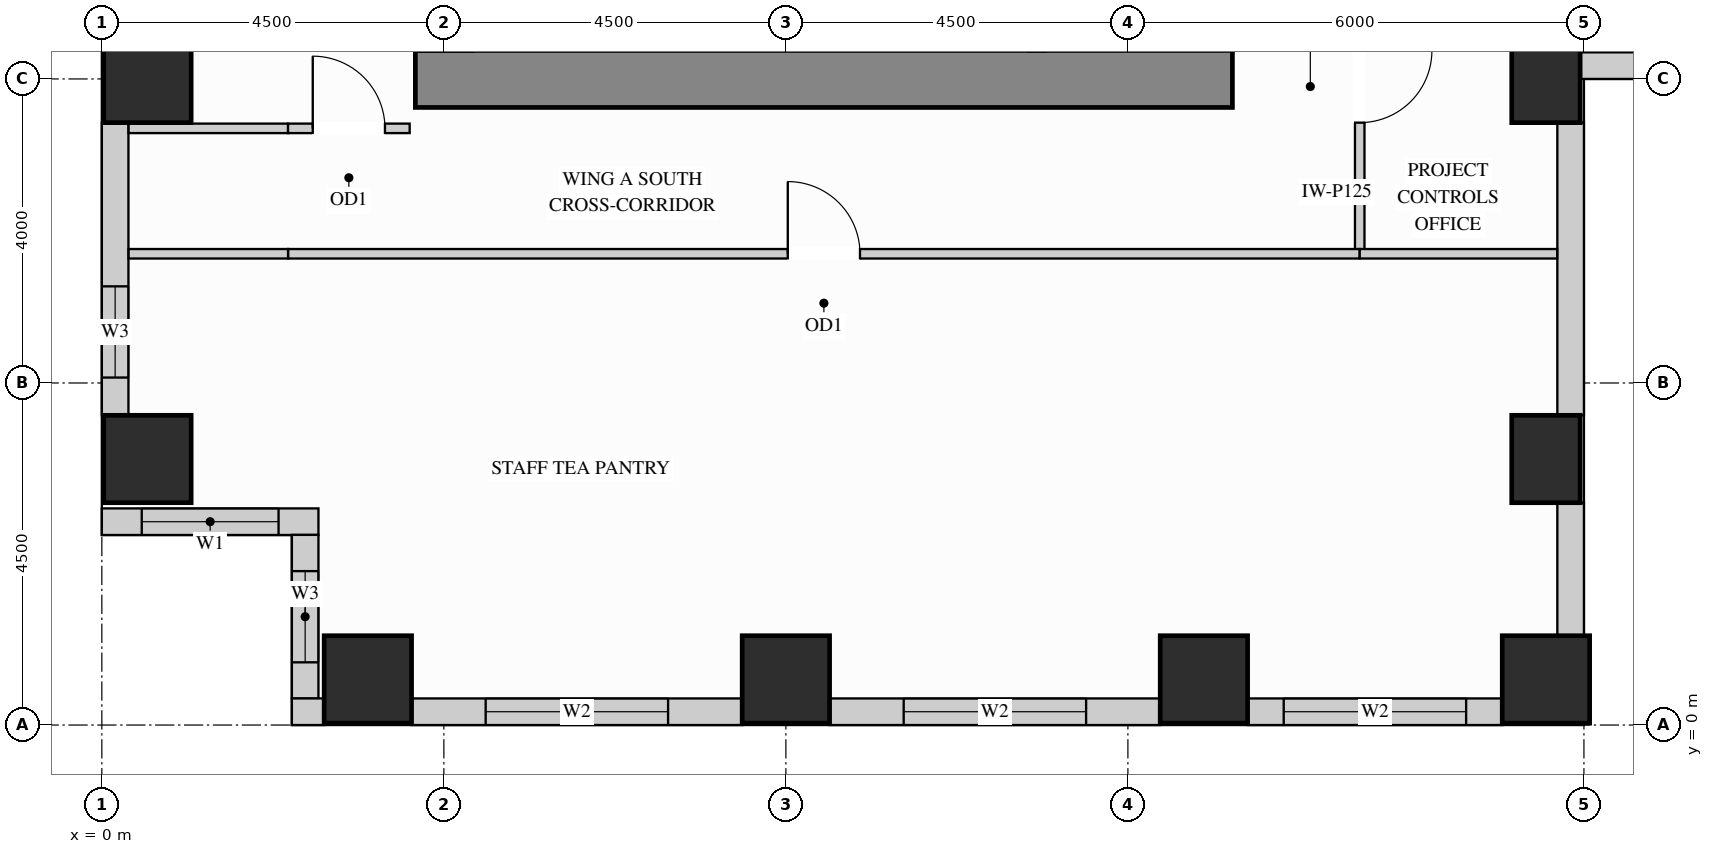
"""IFC4 building model, lengths in metres.
Left out: names, types, materials, properties, quantities, classifications, styles, units other than length and angle.
Written with IfcOpenShell. Run it as: python <this file> out.ifc"""

import sys

from ifc_helpers import new_model, si_unit, direction, frame, frame_2d, origin, origin_2d, place, context, subcontext, project, spatial, rectangle, extrude, source, transform, mapped, element, fill, save


model = new_model("IFC4")
c1 = context("Model", 3, precision=1e-05, world=origin(), true_north=direction((0.0, 1.0)))
c2 = subcontext(c1, "Body", "Model", "MODEL_VIEW")
j1 = project(units=[si_unit("LENGTHUNIT", "METRE"), si_unit("PLANEANGLEUNIT", "RADIAN")], contexts=[c1])
p1 = place(None, origin())
s1 = spatial("IfcSite", under=j1, at=p1, CompositionType="ELEMENT")
p2 = place(p1, origin())
s2 = spatial("IfcBuilding", under=s1, at=p2, CompositionType="ELEMENT")
p3 = place(p2, frame((0.0, 0.0, 135.0)))
s3 = spatial("IfcBuildingStorey", under=s2, at=p3, CompositionType="ELEMENT", Elevation=135.0)
m1 = source(origin(), c2, "Body", "SweptSolid", [
    extrude(rectangle(XDim=0.9, YDim=1.15, at=origin_2d()), origin(), (0.0, 0.0, 1.0), 3.32),
])
for number, where, z_axis, x_axis in (
    (1, (19.0, 3.5, 0.0), (0.0, 0.0, 1.0), (1.0, 0.0, 0.0)),
    (2, (19.0, 8.5, 0.0), (0.0, 0.0, 1.0), (1.0, 0.0, 0.0)),
):
    element("IfcColumn", number, at=place(p3, frame(where, z_axis=z_axis, x_axis=x_axis)), inside=s3, PredefinedType="COLUMN", context=c2, shape_type="MappedRepresentation", body=[
        mapped(m1, transform((0.0, 0.0, 0.0), x_axis=(1.0, 0.0, 0.0), y_axis=(0.0, 1.0, 0.0), z_axis=(0.0, 0.0, 1.0))),
    ])
m2 = source(origin(), c2, "Body", "SweptSolid", [
    extrude(rectangle(XDim=1.15, YDim=1.15, at=origin_2d()), origin(), (0.0, 0.0, 1.0), 3.32),
])
for number, where, z_axis, x_axis in (
    (3, (14.5, 0.6, 0.0), (0.0, 0.0, 1.0), (1.0, 0.0, 0.0)),
    (4, (19.0, 0.6, 0.0), (0.0, 0.0, 1.0), (1.0, 0.0, 0.0)),
    (5, (3.5, 0.6, 0.0), (0.0, 0.0, 1.0), (1.0, 0.0, 0.0)),
    (6, (9.0, 0.6, 0.0), (0.0, 0.0, 1.0), (1.0, 0.0, 0.0)),
    (7, (0.6, 3.5, 0.0), (0.0, 0.0, 1.0), (1.0, 0.0, 0.0)),
    (8, (0.6, 8.5, 0.0), (0.0, 0.0, 1.0), (1.0, 0.0, 0.0)),
):
    element("IfcColumn", number, at=place(p3, frame(where, z_axis=z_axis, x_axis=x_axis)), inside=s3, PredefinedType="COLUMN", context=c2, shape_type="MappedRepresentation", body=[
        mapped(m2, transform((0.0, 0.0, 0.0), x_axis=(1.0, 0.0, 0.0), y_axis=(0.0, 1.0, 0.0), z_axis=(0.0, 0.0, 1.0))),
    ])
m3 = source(origin(), c2, "Body", "SweptSolid", [
    extrude(rectangle(XDim=10.75, YDim=0.75, at=frame_2d((5.375, 0.0))), origin(), (0.0, 0.0, 1.0), 3.32),
])
p4 = place(p3, frame((4.125, 8.5, 0.0), z_axis=(0.0, 0.0, 1.0), x_axis=(1.0, 0.0, 0.0)))
e9 = element("IfcWall", 9, at=p4, inside=s3, PredefinedType="SHEAR", context=c2, shape_type="MappedRepresentation", body=[
    mapped(m3, transform((0.0, 0.0, 0.0), x_axis=(1.0, 0.0, 0.0), y_axis=(0.0, 1.0, 0.0), z_axis=(0.0, 0.0, 1.0))),
])
p5 = place(p3, frame((0.175, 7.927, 0.0), z_axis=(0.0, 0.0, 1.0), x_axis=(0.0, -1.0, 0.0)))
e10 = element("IfcWall", 10, at=p5, inside=s3, PredefinedType="SOLIDWALL", context=c2, shape_type="SweptSolid", body=[
    extrude(rectangle(XDim=3.854, YDim=0.35, at=frame_2d((1.927, 0.0))), origin(), (0.0, 0.0, 1.0), 3.305),
])
p6 = place(p5, frame((2.156, 0.0, 0.78)))
e11 = element("IfcOpeningElement", 11, at=p6, cuts=e10, PredefinedType="OPENING", context=c2, shape_type="SweptSolid", body=[
    extrude(rectangle(XDim=1.2, YDim=2.1, at=frame_2d((0.6, 1.05))), frame((0.0, 0.185, 0.0), z_axis=(0.0, -1.0, 0.0), x_axis=(1.0, 0.0, 0.0)), (0.0, 0.0, 1.0), 0.37),
])
p7 = place(p3, frame((0.0, 2.675, 0.0), z_axis=(0.0, 0.0, 1.0), x_axis=(1.0, 0.0, 0.0)))
e12 = element("IfcWall", 12, at=p7, inside=s3, PredefinedType="SOLIDWALL", context=c2, shape_type="SweptSolid", body=[
    extrude(rectangle(XDim=2.85, YDim=0.35, at=frame_2d((1.425, 0.0))), origin(), (0.0, 0.0, 1.0), 3.305),
])
p8 = place(p7, frame((0.525, 0.0, 0.78)))
e13 = element("IfcOpeningElement", 13, at=p8, cuts=e12, PredefinedType="OPENING", context=c2, shape_type="SweptSolid", body=[
    extrude(rectangle(XDim=1.8, YDim=2.1, at=frame_2d((0.9, 1.05))), frame((0.0, 0.185, 0.0), z_axis=(0.0, -1.0, 0.0), x_axis=(1.0, 0.0, 0.0)), (0.0, 0.0, 1.0), 0.37),
])
p9 = place(p3, frame((2.675, 2.502, 0.0), z_axis=(0.0, 0.0, 1.0), x_axis=(0.0, -1.0, 0.0)))
e14 = element("IfcWall", 14, at=p9, inside=s3, PredefinedType="SOLIDWALL", context=c2, shape_type="SweptSolid", body=[
    extrude(rectangle(XDim=2.154, YDim=0.35, at=frame_2d((1.077, 0.0))), origin(), (0.0, 0.0, 1.0), 3.305),
])
p10 = place(p9, frame((0.477, 0.0, 0.78)))
e15 = element("IfcOpeningElement", 15, at=p10, cuts=e14, PredefinedType="OPENING", context=c2, shape_type="SweptSolid", body=[
    extrude(rectangle(XDim=1.2, YDim=2.1, at=frame_2d((0.6, 1.05))), frame((0.0, 0.185, 0.0), z_axis=(0.0, -1.0, 0.0), x_axis=(1.0, 0.0, 0.0)), (0.0, 0.0, 1.0), 0.37),
])
m4 = source(origin(), c2, "Body", "SweptSolid", [
    extrude(rectangle(XDim=0.427, YDim=0.35, at=frame_2d((0.213, 0.0))), origin(), (0.0, 0.0, 1.0), 3.305),
])
p11 = place(p3, frame((2.5, 0.175, 0.0), z_axis=(0.0, 0.0, 1.0), x_axis=(1.0, 0.0, 0.0)))
e16 = element("IfcWall", 16, at=p11, inside=s3, PredefinedType="SOLIDWALL", context=c2, shape_type="MappedRepresentation", body=[
    mapped(m4, transform((0.0, 0.0, 0.0), x_axis=(1.0, 0.0, 0.0), y_axis=(0.0, 1.0, 0.0), z_axis=(0.0, 0.0, 1.0))),
])
p12 = place(p3, frame((4.073, 0.175, 0.0), z_axis=(0.0, 0.0, 1.0), x_axis=(1.0, 0.0, 0.0)))
e17 = element("IfcWall", 17, at=p12, inside=s3, PredefinedType="SOLIDWALL", context=c2, shape_type="SweptSolid", body=[
    extrude(rectangle(XDim=4.354, YDim=0.35, at=frame_2d((2.177, 0.0))), origin(), (0.0, 0.0, 1.0), 3.305),
])
p13 = place(p12, frame((0.977, 0.0, 0.78)))
e18 = element("IfcOpeningElement", 18, at=p13, cuts=e17, PredefinedType="OPENING", context=c2, shape_type="SweptSolid", body=[
    extrude(rectangle(XDim=2.4, YDim=2.1, at=frame_2d((1.2, 1.05))), frame((0.0, 0.185, 0.0), z_axis=(0.0, -1.0, 0.0), x_axis=(1.0, 0.0, 0.0)), (0.0, 0.0, 1.0), 0.37),
])
p14 = place(p3, frame((9.573, 0.175, 0.0), z_axis=(0.0, 0.0, 1.0), x_axis=(1.0, 0.0, 0.0)))
e19 = element("IfcWall", 19, at=p14, inside=s3, PredefinedType="SOLIDWALL", context=c2, shape_type="SweptSolid", body=[
    extrude(rectangle(XDim=4.354, YDim=0.35, at=frame_2d((2.177, 0.0))), origin(), (0.0, 0.0, 1.0), 3.305),
])
p15 = place(p14, frame((0.977, 0.0, 0.78)))
e20 = element("IfcOpeningElement", 20, at=p15, cuts=e19, PredefinedType="OPENING", context=c2, shape_type="SweptSolid", body=[
    extrude(rectangle(XDim=2.4, YDim=2.1, at=frame_2d((1.2, 1.05))), frame((0.0, 0.185, 0.0), z_axis=(0.0, -1.0, 0.0), x_axis=(1.0, 0.0, 0.0)), (0.0, 0.0, 1.0), 0.37),
])
p16 = place(p3, frame((15.073, 0.175, 0.0), z_axis=(0.0, 0.0, 1.0), x_axis=(1.0, 0.0, 0.0)))
e21 = element("IfcWall", 21, at=p16, inside=s3, PredefinedType="SOLIDWALL", context=c2, shape_type="SweptSolid", body=[
    extrude(rectangle(XDim=3.354, YDim=0.35, at=frame_2d((1.677, 0.0))), origin(), (0.0, 0.0, 1.0), 3.305),
])
p17 = place(p16, frame((0.477, 0.0, 0.78)))
e22 = element("IfcOpeningElement", 22, at=p17, cuts=e21, PredefinedType="OPENING", context=c2, shape_type="SweptSolid", body=[
    extrude(rectangle(XDim=2.4, YDim=2.1, at=frame_2d((1.2, 1.05))), frame((0.0, 0.185, 0.0), z_axis=(0.0, -1.0, 0.0), x_axis=(1.0, 0.0, 0.0)), (0.0, 0.0, 1.0), 0.37),
])
m5 = source(origin(), c2, "Body", "SweptSolid", [
    extrude(rectangle(XDim=1.754, YDim=0.35, at=frame_2d((0.877, 0.0))), origin(), (0.0, 0.0, 1.0), 2.459),
])
p18 = place(p3, frame((19.325, 1.173, 0.0), z_axis=(0.0, 0.0, 1.0), x_axis=(0.0, 1.0, 0.0)))
e23 = element("IfcWall", 23, at=p18, inside=s3, PredefinedType="SOLIDWALL", context=c2, shape_type="MappedRepresentation", body=[
    mapped(m5, transform((0.0, 0.0, 0.0), x_axis=(1.0, 0.0, 0.0), y_axis=(0.0, 1.0, 0.0), z_axis=(0.0, 0.0, 1.0))),
])
m6 = source(origin(), c2, "Body", "SweptSolid", [
    extrude(rectangle(XDim=3.854, YDim=0.35, at=frame_2d((1.927, 0.0))), origin(), (0.0, 0.0, 1.0), 2.459),
])
p19 = place(p3, frame((19.325, 4.073, 0.0), z_axis=(0.0, 0.0, 1.0), x_axis=(0.0, 1.0, 0.0)))
e24 = element("IfcWall", 24, at=p19, inside=s3, PredefinedType="SOLIDWALL", context=c2, shape_type="MappedRepresentation", body=[
    mapped(m6, transform((0.0, 0.0, 0.0), x_axis=(1.0, 0.0, 0.0), y_axis=(0.0, 1.0, 0.0), z_axis=(0.0, 0.0, 1.0))),
])
p20 = place(p3, frame((19.448, 8.675, 0.0), z_axis=(0.0, 0.0, 1.0), x_axis=(1.0, 0.0, 0.0)))
e25 = element("IfcWall", 25, at=p20, inside=s3, PredefinedType="SOLIDWALL", context=c2, shape_type="SweptSolid", body=[
    extrude(rectangle(XDim=3.504, YDim=0.35, at=frame_2d((1.752, 0.0))), origin(), (0.0, 0.0, 1.0), 3.305),
])
p21 = place(p20, frame((1.002, 0.0, 0.78)))
e26 = element("IfcOpeningElement", 26, at=p21, cuts=e25, PredefinedType="OPENING", context=c2, shape_type="SweptSolid", body=[
    extrude(rectangle(XDim=1.5, YDim=2.0, at=frame_2d((0.75, 1.0))), frame((0.0, 0.185, 0.0), z_axis=(0.0, -1.0, 0.0), x_axis=(1.0, 0.0, 0.0)), (0.0, 0.0, 1.0), 0.37),
])
p22 = place(p3, frame((16.55, 6.2, 0.0), z_axis=(0.0, 0.0, 1.0), x_axis=(0.0, 1.0, 0.0)))
e27 = element("IfcWall", 27, at=p22, inside=s3, PredefinedType="PARTITIONING", context=c2, shape_type="SweptSolid", body=[
    extrude(rectangle(XDim=4.4, YDim=0.125, at=frame_2d((2.2, 0.0))), origin(), (0.0, 0.0, 1.0), 3.305),
])
p23 = place(p22, frame((1.725, 0.0, 0.0)))
e28 = element("IfcOpeningElement", 28, at=p23, cuts=e27, PredefinedType="OPENING", context=c2, shape_type="SweptSolid", body=[
    extrude(rectangle(XDim=0.95, YDim=2.15, at=frame_2d((0.475, 1.075))), frame((0.0, 0.073, 0.0), z_axis=(0.0, -1.0, 0.0), x_axis=(1.0, 0.0, 0.0)), (0.0, 0.0, 1.0), 0.145),
])
m7 = source(origin(), c2, "Body", "SweptSolid", [
    extrude(rectangle(XDim=2.098, YDim=0.125, at=frame_2d((1.049, 0.0))), origin(), (0.0, 0.0, 1.0), 3.305),
])
p24 = place(p3, frame((0.352, 7.85, 0.0), z_axis=(0.0, 0.0, 1.0), x_axis=(1.0, 0.0, 0.0)))
e29 = element("IfcWall", 29, at=p24, inside=s3, PredefinedType="PARTITIONING", context=c2, shape_type="MappedRepresentation", body=[
    mapped(m7, transform((0.0, 0.0, 0.0), x_axis=(1.0, 0.0, 0.0), y_axis=(0.0, 1.0, 0.0), z_axis=(0.0, 0.0, 1.0))),
])
p25 = place(p3, frame((2.45, 7.85, 0.0), z_axis=(0.0, 0.0, 1.0), x_axis=(1.0, 0.0, 0.0)))
e30 = element("IfcWall", 30, at=p25, inside=s3, PredefinedType="PARTITIONING", context=c2, shape_type="SweptSolid", body=[
    extrude(rectangle(XDim=1.6, YDim=0.125, at=frame_2d((0.8, 0.0))), origin(), (0.0, 0.0, 1.0), 3.305),
])
p26 = place(p25, frame((0.325, 0.0, 0.0)))
e31 = element("IfcOpeningElement", 31, at=p26, cuts=e30, PredefinedType="OPENING", context=c2, shape_type="SweptSolid", body=[
    extrude(rectangle(XDim=0.95, YDim=2.15, at=frame_2d((0.475, 1.075))), frame((0.0, 0.073, 0.0), z_axis=(0.0, -1.0, 0.0), x_axis=(1.0, 0.0, 0.0)), (0.0, 0.0, 1.0), 0.145),
])
p27 = place(p3, frame((2.45, 6.2, 0.0), z_axis=(0.0, 0.0, 1.0), x_axis=(1.0, 0.0, 0.0)))
e32 = element("IfcWall", 32, at=p27, inside=s3, PredefinedType="PARTITIONING", context=c2, shape_type="SweptSolid", body=[
    extrude(rectangle(XDim=14.1, YDim=0.125, at=frame_2d((7.05, 0.0))), origin(), (0.0, 0.0, 1.0), 2.768),
])
p28 = place(p27, frame((6.575, 0.0, 0.0)))
e33 = element("IfcOpeningElement", 33, at=p28, cuts=e32, PredefinedType="OPENING", context=c2, shape_type="SweptSolid", body=[
    extrude(rectangle(XDim=0.95, YDim=2.15, at=frame_2d((0.475, 1.075))), frame((0.0, 0.073, 0.0), z_axis=(0.0, -1.0, 0.0), x_axis=(1.0, 0.0, 0.0)), (0.0, 0.0, 1.0), 0.145),
])
m8 = source(origin(), c2, "Body", "SweptSolid", [
    extrude(rectangle(XDim=2.098, YDim=0.125, at=frame_2d((1.049, 0.0))), origin(), (0.0, 0.0, 1.0), 2.768),
])
p29 = place(p3, frame((0.352, 6.2, 0.0), z_axis=(0.0, 0.0, 1.0), x_axis=(1.0, 0.0, 0.0)))
e34 = element("IfcWall", 34, at=p29, inside=s3, PredefinedType="PARTITIONING", context=c2, shape_type="MappedRepresentation", body=[
    mapped(m8, transform((0.0, 0.0, 0.0), x_axis=(1.0, 0.0, 0.0), y_axis=(0.0, 1.0, 0.0), z_axis=(0.0, 0.0, 1.0))),
])
m9 = source(origin(), c2, "Body", "SweptSolid", [
    extrude(rectangle(XDim=2.598, YDim=0.125, at=frame_2d((1.299, 0.0))), origin(), (0.0, 0.0, 1.0), 2.768),
])
p30 = place(p3, frame((16.55, 6.2, 0.0), z_axis=(0.0, 0.0, 1.0), x_axis=(1.0, 0.0, 0.0)))
e35 = element("IfcWall", 35, at=p30, inside=s3, PredefinedType="PARTITIONING", context=c2, shape_type="MappedRepresentation", body=[
    mapped(m9, transform((0.0, 0.0, 0.0), x_axis=(1.0, 0.0, 0.0), y_axis=(0.0, 1.0, 0.0), z_axis=(0.0, 0.0, 1.0))),
])
m10 = source(origin(), c2, "Body", "SweptSolid", [
    extrude(rectangle(XDim=0.95, YDim=2.15, at=frame_2d((0.475, 1.075))), frame((0.0, 0.025, 0.0), z_axis=(0.0, -1.0, 0.0), x_axis=(1.0, 0.0, 0.0)), (0.0, 0.0, 1.0), 0.05),
])
p31 = place(p23, origin())
e36 = element("IfcDoor", 36, at=p31, inside=s3, OperationType="SINGLE_SWING_RIGHT", PredefinedType="DOOR", context=c2, shape_type="MappedRepresentation", body=[
    mapped(m10, transform((0.0, 0.0, 0.0), x_axis=(1.0, 0.0, 0.0), y_axis=(0.0, 1.0, 0.0), z_axis=(0.0, 0.0, 1.0))),
])
fill(e28, e36)
p32 = place(p28, origin())
e37 = element("IfcDoor", 37, at=p32, inside=s3, OperationType="SINGLE_SWING_LEFT", PredefinedType="DOOR", context=c2, shape_type="MappedRepresentation", body=[
    mapped(m10, transform((0.0, 0.0, 0.0), x_axis=(1.0, 0.0, 0.0), y_axis=(0.0, 1.0, 0.0), z_axis=(0.0, 0.0, 1.0))),
])
fill(e33, e37)
p33 = place(p26, origin())
e38 = element("IfcDoor", 38, at=p33, inside=s3, OperationType="SINGLE_SWING_LEFT", PredefinedType="DOOR", context=c2, shape_type="MappedRepresentation", body=[
    mapped(m10, transform((0.0, 0.0, 0.0), x_axis=(1.0, 0.0, 0.0), y_axis=(0.0, 1.0, 0.0), z_axis=(0.0, 0.0, 1.0))),
])
fill(e31, e38)
m11 = source(origin(), c2, "Body", "SweptSolid", [
    extrude(rectangle(XDim=1.8, YDim=2.1, at=frame_2d((0.9, 1.05))), frame((0.0, 0.03, 0.0), z_axis=(0.0, -1.0, 0.0), x_axis=(1.0, 0.0, 0.0)), (0.0, 0.0, 1.0), 0.06),
])
p34 = place(p8, origin())
e39 = element("IfcWindow", 39, at=p34, inside=s3, PartitioningType="SINGLE_PANEL", PredefinedType="WINDOW", context=c2, shape_type="MappedRepresentation", body=[
    mapped(m11, transform((0.0, 0.0, 0.0), x_axis=(1.0, 0.0, 0.0), y_axis=(0.0, 1.0, 0.0), z_axis=(0.0, 0.0, 1.0))),
])
fill(e13, e39)
m12 = source(origin(), c2, "Body", "SweptSolid", [
    extrude(rectangle(XDim=2.4, YDim=2.1, at=frame_2d((1.2, 1.05))), frame((0.0, 0.03, 0.0), z_axis=(0.0, -1.0, 0.0), x_axis=(1.0, 0.0, 0.0)), (0.0, 0.0, 1.0), 0.06),
])
p35 = place(p13, origin())
e40 = element("IfcWindow", 40, at=p35, inside=s3, PartitioningType="SINGLE_PANEL", PredefinedType="WINDOW", context=c2, shape_type="MappedRepresentation", body=[
    mapped(m12, transform((0.0, 0.0, 0.0), x_axis=(1.0, 0.0, 0.0), y_axis=(0.0, 1.0, 0.0), z_axis=(0.0, 0.0, 1.0))),
])
fill(e18, e40)
p36 = place(p15, origin())
e41 = element("IfcWindow", 41, at=p36, inside=s3, PartitioningType="SINGLE_PANEL", PredefinedType="WINDOW", context=c2, shape_type="MappedRepresentation", body=[
    mapped(m12, transform((0.0, 0.0, 0.0), x_axis=(1.0, 0.0, 0.0), y_axis=(0.0, 1.0, 0.0), z_axis=(0.0, 0.0, 1.0))),
])
fill(e20, e41)
p37 = place(p17, origin())
e42 = element("IfcWindow", 42, at=p37, inside=s3, PartitioningType="SINGLE_PANEL", PredefinedType="WINDOW", context=c2, shape_type="MappedRepresentation", body=[
    mapped(m12, transform((0.0, 0.0, 0.0), x_axis=(1.0, 0.0, 0.0), y_axis=(0.0, 1.0, 0.0), z_axis=(0.0, 0.0, 1.0))),
])
fill(e22, e42)
m13 = source(origin(), c2, "Body", "SweptSolid", [
    extrude(rectangle(XDim=1.2, YDim=2.1, at=frame_2d((0.6, 1.05))), frame((0.0, 0.03, 0.0), z_axis=(0.0, -1.0, 0.0), x_axis=(1.0, 0.0, 0.0)), (0.0, 0.0, 1.0), 0.06),
])
p38 = place(p6, origin())
e43 = element("IfcWindow", 43, at=p38, inside=s3, PartitioningType="SINGLE_PANEL", PredefinedType="WINDOW", context=c2, shape_type="MappedRepresentation", body=[
    mapped(m13, transform((0.0, 0.0, 0.0), x_axis=(1.0, 0.0, 0.0), y_axis=(0.0, 1.0, 0.0), z_axis=(0.0, 0.0, 1.0))),
])
fill(e11, e43)
p39 = place(p10, origin())
e44 = element("IfcWindow", 44, at=p39, inside=s3, PartitioningType="SINGLE_PANEL", PredefinedType="WINDOW", context=c2, shape_type="MappedRepresentation", body=[
    mapped(m13, transform((0.0, 0.0, 0.0), x_axis=(1.0, 0.0, 0.0), y_axis=(0.0, 1.0, 0.0), z_axis=(0.0, 0.0, 1.0))),
])
fill(e15, e44)
save(model, sys.argv[1])
